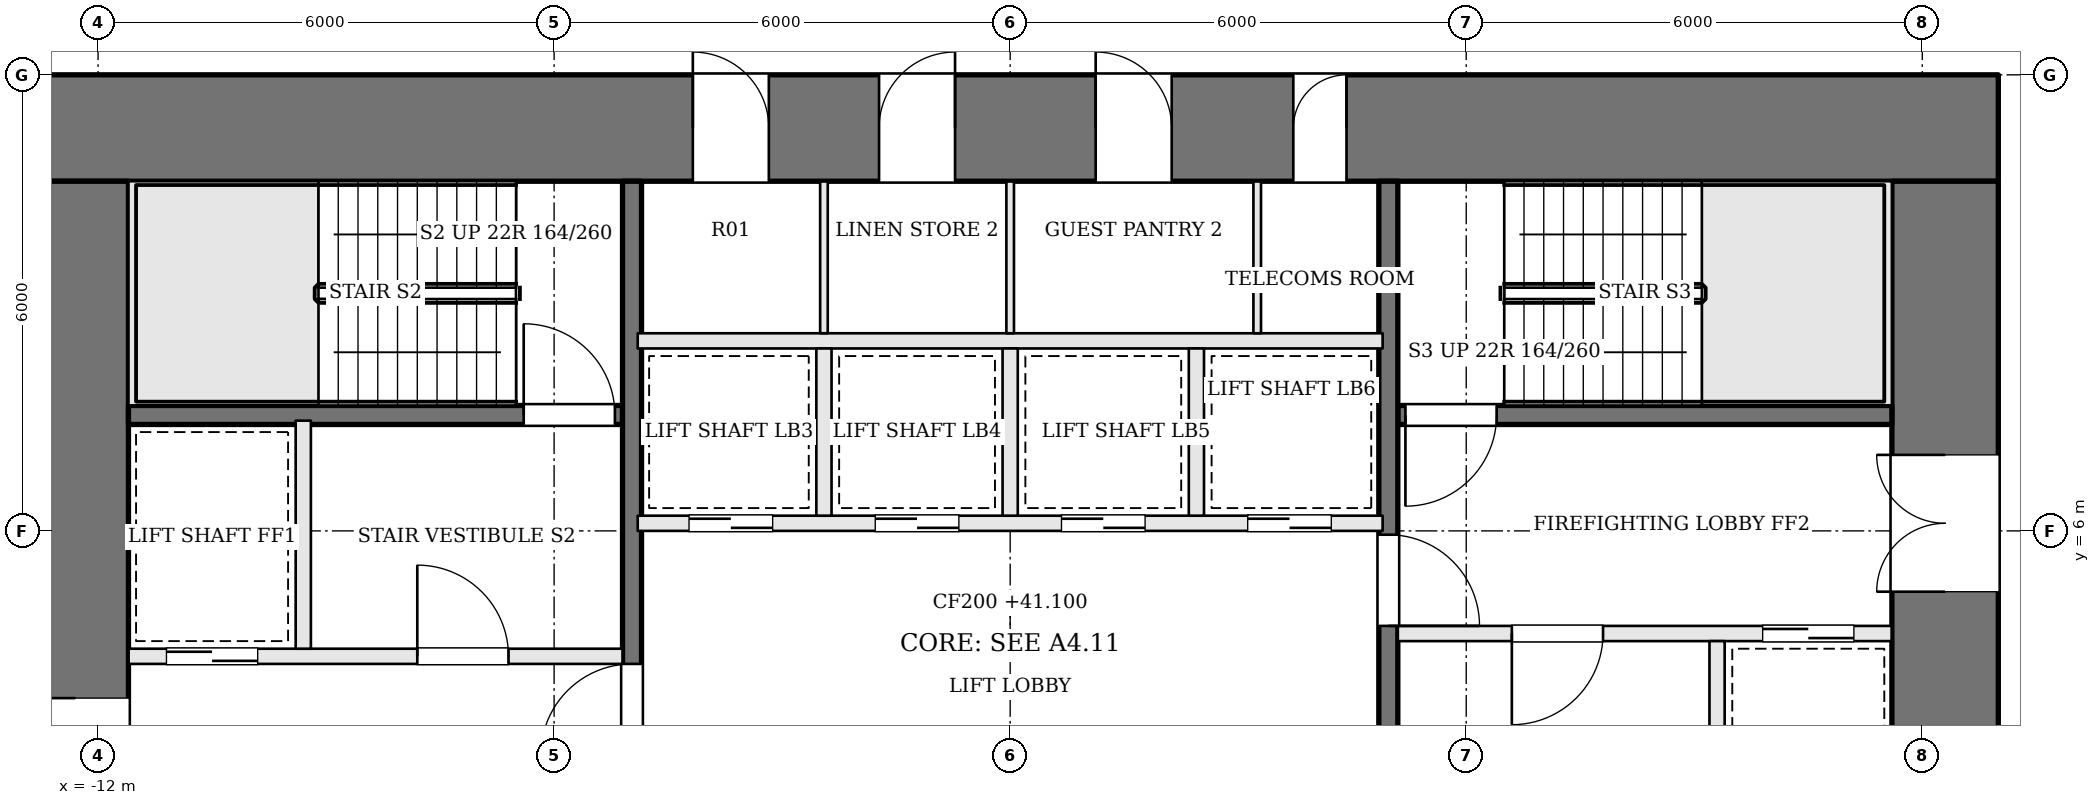
"""IFC4 building model, lengths in metres.
Left out: names, types, materials, properties, quantities, classifications, styles, units other than length and angle.
Written with IfcOpenShell. Run it as: python <this file> out.ifc"""

import sys

from ifc_helpers import new_model, si_unit, direction, frame, frame_2d, origin, place, context, subcontext, project, spatial, rectangle, extrude, element, fill, save


model = new_model("IFC4")
c1 = context("Model", 3, precision=1e-05, world=origin(), true_north=direction((0.0, 1.0)))
c2 = subcontext(c1, "Body", "Model", "MODEL_VIEW")
j1 = project(units=[si_unit("LENGTHUNIT", "METRE"), si_unit("PLANEANGLEUNIT", "RADIAN")], contexts=[c1])
p1 = place(None, origin())
s1 = spatial("IfcSite", under=j1, at=p1, CompositionType="ELEMENT")
p2 = place(p1, origin())
s2 = spatial("IfcBuilding", under=s1, at=p2, CompositionType="ELEMENT")
p3 = place(p2, frame((0.0, 0.0, 41.1)))
s3 = spatial("IfcBuildingStorey", under=s2, at=p3, CompositionType="ELEMENT", Elevation=41.1)
p4 = place(p3, frame((-13.0, 11.3, 0.0), z_axis=(0.0, 0.0, 1.0), x_axis=(1.0, 0.0, 0.0)))
e1 = element("IfcWall", 1, at=p4, inside=s3, PredefinedType="SHEAR", context=c2, shape_type="SweptSolid", body=[
    extrude(rectangle(XDim=26.0, YDim=1.4, at=frame_2d((13.0, 0.0))), origin(), (0.0, 0.0, 1.0), 3.6),
])
p5 = place(p4, frame((8.825, 0.0, 0.0)))
e2 = element("IfcOpeningElement", 2, at=p5, cuts=e1, PredefinedType="OPENING", context=c2, shape_type="SweptSolid", body=[
    extrude(rectangle(XDim=1.0, YDim=2.1, at=frame_2d((0.5, 1.05))), frame((0.0, 0.71, 0.0), z_axis=(0.0, -1.0, 0.0), x_axis=(1.0, 0.0, 0.0)), (0.0, 0.0, 1.0), 1.42),
])
p6 = place(p4, frame((11.275, 0.0, 0.0)))
e3 = element("IfcOpeningElement", 3, at=p6, cuts=e1, PredefinedType="OPENING", context=c2, shape_type="SweptSolid", body=[
    extrude(rectangle(XDim=1.0, YDim=2.1, at=frame_2d((0.5, 1.05))), frame((0.0, 0.71, 0.0), z_axis=(0.0, -1.0, 0.0), x_axis=(1.0, 0.0, 0.0)), (0.0, 0.0, 1.0), 1.42),
])
p7 = place(p4, frame((14.125, 0.0, 0.0)))
e4 = element("IfcOpeningElement", 4, at=p7, cuts=e1, PredefinedType="OPENING", context=c2, shape_type="SweptSolid", body=[
    extrude(rectangle(XDim=1.0, YDim=2.1, at=frame_2d((0.5, 1.05))), frame((0.0, 0.71, 0.0), z_axis=(0.0, -1.0, 0.0), x_axis=(1.0, 0.0, 0.0)), (0.0, 0.0, 1.0), 1.42),
])
p8 = place(p4, frame((16.725, 0.0, 0.0)))
e5 = element("IfcOpeningElement", 5, at=p8, cuts=e1, PredefinedType="OPENING", context=c2, shape_type="SweptSolid", body=[
    extrude(rectangle(XDim=0.7, YDim=2.1, at=frame_2d((0.35, 1.05))), frame((0.0, 0.71, 0.0), z_axis=(0.0, -1.0, 0.0), x_axis=(1.0, 0.0, 0.0)), (0.0, 0.0, 1.0), 1.42),
])
p9 = place(p3, frame((12.3, -1.6, 0.0), z_axis=(0.0, 0.0, 1.0), x_axis=(0.0, 1.0, 0.0)))
e6 = element("IfcWall", 6, at=p9, inside=s3, PredefinedType="SHEAR", context=c2, shape_type="SweptSolid", body=[
    extrude(rectangle(XDim=12.2, YDim=1.4, at=frame_2d((6.1, 0.0))), origin(), (0.0, 0.0, 1.0), 3.6),
])
p10 = place(p9, frame((6.8, 0.0, 0.0)))
e7 = element("IfcOpeningElement", 7, at=p10, cuts=e6, PredefinedType="OPENING", context=c2, shape_type="SweptSolid", body=[
    extrude(rectangle(XDim=1.8, YDim=2.1, at=frame_2d((0.9, 1.05))), frame((0.0, 0.71, 0.0), z_axis=(0.0, -1.0, 0.0), x_axis=(1.0, 0.0, 0.0)), (0.0, 0.0, 1.0), 1.42),
])
p11 = place(p3, frame((-12.3, -1.6, 0.0), z_axis=(0.0, 0.0, 1.0), x_axis=(0.0, 1.0, 0.0)))
e8 = element("IfcWall", 8, at=p11, inside=s3, PredefinedType="SHEAR", context=c2, shape_type="SweptSolid", body=[
    extrude(rectangle(XDim=12.2, YDim=1.4, at=frame_2d((6.1, 0.0))), origin(), (0.0, 0.0, 1.0), 3.6),
])
p12 = place(p11, frame((3.6, 0.0, 0.0)))
e9 = element("IfcOpeningElement", 9, at=p12, cuts=e8, PredefinedType="OPENING", context=c2, shape_type="SweptSolid", body=[
    extrude(rectangle(XDim=1.8, YDim=2.1, at=frame_2d((0.9, 1.05))), frame((0.0, 0.71, 0.0), z_axis=(0.0, -1.0, 0.0), x_axis=(1.0, 0.0, 0.0)), (0.0, 0.0, 1.0), 1.42),
])
p13 = place(p3, frame((11.6, 7.525, 0.0), z_axis=(0.0, 0.0, 1.0), x_axis=(-1.0, 0.0, 0.0)))
e10 = element("IfcWall", 10, at=p13, inside=s3, PredefinedType="SOLIDWALL", context=c2, shape_type="SweptSolid", body=[
    extrude(rectangle(XDim=6.5, YDim=0.25, at=frame_2d((3.25, 0.0))), origin(), (0.0, 0.0, 1.0), 3.4),
])
p14 = place(p13, frame((5.2, 0.0, 0.0)))
e11 = element("IfcOpeningElement", 11, at=p14, cuts=e10, PredefinedType="OPENING", context=c2, shape_type="SweptSolid", body=[
    extrude(rectangle(XDim=1.2, YDim=2.1, at=frame_2d((0.6, 1.05))), frame((0.0, 0.135, 0.0), z_axis=(0.0, -1.0, 0.0), x_axis=(1.0, 0.0, 0.0)), (0.0, 0.0, 1.0), 0.27),
])
p15 = place(p3, frame((-11.6, 4.35, 0.0), z_axis=(0.0, 0.0, 1.0), x_axis=(1.0, 0.0, 0.0)))
e12 = element("IfcWall", 12, at=p15, inside=s3, PredefinedType="SOLIDWALL", context=c2, shape_type="SweptSolid", body=[
    extrude(rectangle(XDim=6.5, YDim=0.2, at=frame_2d((3.25, 0.0))), origin(), (0.0, 0.0, 1.0), 3.4),
])
p16 = place(p15, frame((3.8, 0.0, 0.0)))
e13 = element("IfcOpeningElement", 13, at=p16, cuts=e12, PredefinedType="OPENING", context=c2, shape_type="SweptSolid", body=[
    extrude(rectangle(XDim=1.2, YDim=2.1, at=frame_2d((0.6, 1.05))), frame((0.0, 0.11, 0.0), z_axis=(0.0, -1.0, 0.0), x_axis=(1.0, 0.0, 0.0)), (0.0, 0.0, 1.0), 0.22),
])
p17 = place(p15, frame((0.5, 0.0, 0.0)))
e14 = element("IfcOpeningElement", 14, at=p17, cuts=e12, PredefinedType="OPENING", context=c2, shape_type="SweptSolid", body=[
    extrude(rectangle(XDim=1.2, YDim=2.1, at=frame_2d((0.6, 1.05))), frame((0.0, 0.11, 0.0), z_axis=(0.0, -1.0, 0.0), x_axis=(1.0, 0.0, 0.0)), (0.0, 0.0, 1.0), 0.22),
])
p18 = place(p3, frame((11.6, 4.65, 0.0), z_axis=(0.0, 0.0, 1.0), x_axis=(-1.0, 0.0, 0.0)))
e15 = element("IfcWall", 15, at=p18, inside=s3, PredefinedType="SOLIDWALL", context=c2, shape_type="SweptSolid", body=[
    extrude(rectangle(XDim=6.5, YDim=0.2, at=frame_2d((3.25, 0.0))), origin(), (0.0, 0.0, 1.0), 3.4),
])
p19 = place(p18, frame((3.8, 0.0, 0.0)))
e16 = element("IfcOpeningElement", 16, at=p19, cuts=e15, PredefinedType="OPENING", context=c2, shape_type="SweptSolid", body=[
    extrude(rectangle(XDim=1.2, YDim=2.1, at=frame_2d((0.6, 1.05))), frame((0.0, 0.11, 0.0), z_axis=(0.0, -1.0, 0.0), x_axis=(1.0, 0.0, 0.0)), (0.0, 0.0, 1.0), 0.22),
])
p20 = place(p18, frame((0.5, 0.0, 0.0)))
e17 = element("IfcOpeningElement", 17, at=p20, cuts=e15, PredefinedType="OPENING", context=c2, shape_type="SweptSolid", body=[
    extrude(rectangle(XDim=1.2, YDim=2.1, at=frame_2d((0.6, 1.05))), frame((0.0, 0.11, 0.0), z_axis=(0.0, -1.0, 0.0), x_axis=(1.0, 0.0, 0.0)), (0.0, 0.0, 1.0), 0.22),
])
p21 = place(p3, frame((-11.6, 7.525, 0.0), z_axis=(0.0, 0.0, 1.0), x_axis=(1.0, 0.0, 0.0)))
e18 = element("IfcWall", 18, at=p21, inside=s3, PredefinedType="SOLIDWALL", context=c2, shape_type="SweptSolid", body=[
    extrude(rectangle(XDim=6.5, YDim=0.25, at=frame_2d((3.25, 0.0))), origin(), (0.0, 0.0, 1.0), 3.4),
])
p22 = place(p21, frame((5.2, 0.0, 0.0)))
e19 = element("IfcOpeningElement", 19, at=p22, cuts=e18, PredefinedType="OPENING", context=c2, shape_type="SweptSolid", body=[
    extrude(rectangle(XDim=1.2, YDim=2.1, at=frame_2d((0.6, 1.05))), frame((0.0, 0.135, 0.0), z_axis=(0.0, -1.0, 0.0), x_axis=(1.0, 0.0, 0.0)), (0.0, 0.0, 1.0), 0.27),
])
for number, where, z_axis, x_axis in (
    (20, (-9.3, 4.45, 0.0), (0.0, 0.0, 1.0), (0.0, 1.0, 0.0)),
    (21, (9.3, 4.55, 0.0), (0.0, 0.0, 1.0), (0.0, -1.0, 0.0)),
):
    element("IfcWall", number, at=place(p3, frame(where, z_axis=z_axis, x_axis=x_axis)), inside=s3, PredefinedType="SOLIDWALL", context=c2, shape_type="SweptSolid", body=[
        extrude(rectangle(XDim=3.0, YDim=0.2, at=frame_2d((1.5, 0.0))), origin(), (0.0, 0.0, 1.0), 3.4),
    ])
p23 = place(p3, frame((-4.975, -1.6, 0.0), z_axis=(0.0, 0.0, 1.0), x_axis=(0.0, 1.0, 0.0)))
e22 = element("IfcWall", 22, at=p23, inside=s3, PredefinedType="SOLIDWALL", context=c2, shape_type="SweptSolid", body=[
    extrude(rectangle(XDim=12.2, YDim=0.25, at=frame_2d((6.1, 0.0))), origin(), (0.0, 0.0, 1.0), 3.4),
])
p24 = place(p23, frame((4.65, 0.0, 0.0)))
e23 = element("IfcOpeningElement", 23, at=p24, cuts=e22, PredefinedType="OPENING", context=c2, shape_type="SweptSolid", body=[
    extrude(rectangle(XDim=1.2, YDim=2.1, at=frame_2d((0.6, 1.05))), frame((0.0, 0.135, 0.0), z_axis=(0.0, -1.0, 0.0), x_axis=(1.0, 0.0, 0.0)), (0.0, 0.0, 1.0), 0.27),
])
p25 = place(p3, frame((4.975, 10.6, 0.0), z_axis=(0.0, 0.0, 1.0), x_axis=(0.0, -1.0, 0.0)))
e24 = element("IfcWall", 24, at=p25, inside=s3, PredefinedType="SOLIDWALL", context=c2, shape_type="SweptSolid", body=[
    extrude(rectangle(XDim=12.2, YDim=0.25, at=frame_2d((6.1, 0.0))), origin(), (0.0, 0.0, 1.0), 3.4),
])
p26 = place(p25, frame((4.65, 0.0, 0.0)))
e25 = element("IfcOpeningElement", 25, at=p26, cuts=e24, PredefinedType="OPENING", context=c2, shape_type="SweptSolid", body=[
    extrude(rectangle(XDim=1.2, YDim=2.1, at=frame_2d((0.6, 1.05))), frame((0.0, 0.135, 0.0), z_axis=(0.0, -1.0, 0.0), x_axis=(1.0, 0.0, 0.0)), (0.0, 0.0, 1.0), 0.27),
])
p27 = place(p3, frame((-4.9, 6.1, 0.0), z_axis=(0.0, 0.0, 1.0), x_axis=(1.0, 0.0, 0.0)))
e26 = element("IfcWall", 26, at=p27, inside=s3, PredefinedType="SOLIDWALL", context=c2, shape_type="SweptSolid", body=[
    extrude(rectangle(XDim=9.8, YDim=0.2, at=frame_2d((4.9, 0.0))), origin(), (0.0, 0.0, 1.0), 3.4),
])
p28 = place(p27, frame((0.675, 0.0, 0.0)))
e27 = element("IfcOpeningElement", 27, at=p28, cuts=e26, PredefinedType="OPENING", context=c2, shape_type="SweptSolid", body=[
    extrude(rectangle(XDim=1.1, YDim=2.1, at=frame_2d((0.55, 1.05))), frame((0.0, 0.11, 0.0), z_axis=(0.0, -1.0, 0.0), x_axis=(1.0, 0.0, 0.0)), (0.0, 0.0, 1.0), 0.22),
])
p29 = place(p27, frame((3.125, 0.0, 0.0)))
e28 = element("IfcOpeningElement", 28, at=p29, cuts=e26, PredefinedType="OPENING", context=c2, shape_type="SweptSolid", body=[
    extrude(rectangle(XDim=1.1, YDim=2.1, at=frame_2d((0.55, 1.05))), frame((0.0, 0.11, 0.0), z_axis=(0.0, -1.0, 0.0), x_axis=(1.0, 0.0, 0.0)), (0.0, 0.0, 1.0), 0.22),
])
p30 = place(p27, frame((5.575, 0.0, 0.0)))
e29 = element("IfcOpeningElement", 29, at=p30, cuts=e26, PredefinedType="OPENING", context=c2, shape_type="SweptSolid", body=[
    extrude(rectangle(XDim=1.1, YDim=2.1, at=frame_2d((0.55, 1.05))), frame((0.0, 0.11, 0.0), z_axis=(0.0, -1.0, 0.0), x_axis=(1.0, 0.0, 0.0)), (0.0, 0.0, 1.0), 0.22),
])
p31 = place(p27, frame((8.025, 0.0, 0.0)))
e30 = element("IfcOpeningElement", 30, at=p31, cuts=e26, PredefinedType="OPENING", context=c2, shape_type="SweptSolid", body=[
    extrude(rectangle(XDim=1.1, YDim=2.1, at=frame_2d((0.55, 1.05))), frame((0.0, 0.11, 0.0), z_axis=(0.0, -1.0, 0.0), x_axis=(1.0, 0.0, 0.0)), (0.0, 0.0, 1.0), 0.22),
])
p32 = place(p3, frame((-4.9, 8.5, 0.0), z_axis=(0.0, 0.0, 1.0), x_axis=(1.0, 0.0, 0.0)))
e31 = element("IfcWall", 31, at=p32, inside=s3, PredefinedType="SOLIDWALL", context=c2, shape_type="SweptSolid", body=[
    extrude(rectangle(XDim=9.8, YDim=0.2, at=frame_2d((4.9, 0.0))), origin(), (0.0, 0.0, 1.0), 3.4),
])
for number, where, z_axis, x_axis in (
    (32, (-2.45, 6.2, 0.0), (0.0, 0.0, 1.0), (0.0, 1.0, 0.0)),
    (33, (0.0, 6.2, 0.0), (0.0, 0.0, 1.0), (0.0, 1.0, 0.0)),
    (34, (2.45, 6.2, 0.0), (0.0, 0.0, 1.0), (0.0, 1.0, 0.0)),
):
    element("IfcWall", number, at=place(p3, frame(where, z_axis=z_axis, x_axis=x_axis)), inside=s3, PredefinedType="SOLIDWALL", context=c2, shape_type="SweptSolid", body=[
        extrude(rectangle(XDim=2.2, YDim=0.2, at=frame_2d((1.1, 0.0))), origin(), (0.0, 0.0, 1.0), 3.4),
    ])
for number, where, z_axis, x_axis in (
    (35, (-2.45, 8.6, 0.0), (0.0, 0.0, 1.0), (0.0, 1.0, 0.0)),
    (36, (0.0, 8.6, 0.0), (0.0, 0.0, 1.0), (0.0, 1.0, 0.0)),
    (37, (3.25, 8.6, 0.0), (0.0, 0.0, 1.0), (0.0, 1.0, 0.0)),
):
    element("IfcWall", number, at=place(p3, frame(where, z_axis=z_axis, x_axis=x_axis)), inside=s3, PredefinedType="PARTITIONING", context=c2, shape_type="SweptSolid", body=[
        extrude(rectangle(XDim=2.0, YDim=0.1, at=frame_2d((1.0, 0.0))), origin(), (0.0, 0.0, 1.0), 3.4),
    ])
p33 = place(p12, origin())
e38 = element("IfcDoor", 38, at=p33, inside=s3, OperationType="DOUBLE_DOOR_SINGLE_SWING", PredefinedType="DOOR", context=c2, shape_type="SweptSolid", body=[
    extrude(rectangle(XDim=1.8, YDim=2.1, at=frame_2d((0.9, 1.05))), frame((0.0, 0.025, 0.0), z_axis=(0.0, -1.0, 0.0), x_axis=(1.0, 0.0, 0.0)), (0.0, 0.0, 1.0), 0.05),
])
fill(e9, e38)
p34 = place(p10, origin())
e39 = element("IfcDoor", 39, at=p34, inside=s3, OperationType="DOUBLE_DOOR_SINGLE_SWING", PredefinedType="DOOR", context=c2, shape_type="SweptSolid", body=[
    extrude(rectangle(XDim=1.8, YDim=2.1, at=frame_2d((0.9, 1.05))), frame((0.0, 0.025, 0.0), z_axis=(0.0, -1.0, 0.0), x_axis=(1.0, 0.0, 0.0)), (0.0, 0.0, 1.0), 0.05),
])
fill(e7, e39)
p35 = place(p24, origin())
e40 = element("IfcDoor", 40, at=p35, inside=s3, OperationType="SINGLE_SWING_LEFT", PredefinedType="DOOR", context=c2, shape_type="SweptSolid", body=[
    extrude(rectangle(XDim=1.2, YDim=2.1, at=frame_2d((0.6, 1.05))), frame((0.0, 0.025, 0.0), z_axis=(0.0, -1.0, 0.0), x_axis=(1.0, 0.0, 0.0)), (0.0, 0.0, 1.0), 0.05),
])
fill(e23, e40)
p36 = place(p26, origin())
e41 = element("IfcDoor", 41, at=p36, inside=s3, OperationType="SINGLE_SWING_RIGHT", PredefinedType="DOOR", context=c2, shape_type="SweptSolid", body=[
    extrude(rectangle(XDim=1.2, YDim=2.1, at=frame_2d((0.6, 1.05))), frame((0.0, 0.025, 0.0), z_axis=(0.0, -1.0, 0.0), x_axis=(1.0, 0.0, 0.0)), (0.0, 0.0, 1.0), 0.05),
])
fill(e25, e41)
p37 = place(p16, origin())
e42 = element("IfcDoor", 42, at=p37, inside=s3, OperationType="SINGLE_SWING_LEFT", PredefinedType="DOOR", context=c2, shape_type="SweptSolid", body=[
    extrude(rectangle(XDim=1.2, YDim=2.1, at=frame_2d((0.6, 1.05))), frame((0.0, 0.025, 0.0), z_axis=(0.0, -1.0, 0.0), x_axis=(1.0, 0.0, 0.0)), (0.0, 0.0, 1.0), 0.05),
])
fill(e13, e42)
p38 = place(p19, origin())
e43 = element("IfcDoor", 43, at=p38, inside=s3, OperationType="SINGLE_SWING_RIGHT", PredefinedType="DOOR", context=c2, shape_type="SweptSolid", body=[
    extrude(rectangle(XDim=1.2, YDim=2.1, at=frame_2d((0.6, 1.05))), frame((0.0, 0.025, 0.0), z_axis=(0.0, -1.0, 0.0), x_axis=(1.0, 0.0, 0.0)), (0.0, 0.0, 1.0), 0.05),
])
fill(e16, e43)
p39 = place(p14, origin())
e44 = element("IfcDoor", 44, at=p39, inside=s3, OperationType="SINGLE_SWING_RIGHT", PredefinedType="DOOR", context=c2, shape_type="SweptSolid", body=[
    extrude(rectangle(XDim=1.2, YDim=2.1, at=frame_2d((0.6, 1.05))), frame((0.0, 0.025, 0.0), z_axis=(0.0, -1.0, 0.0), x_axis=(1.0, 0.0, 0.0)), (0.0, 0.0, 1.0), 0.05),
])
fill(e11, e44)
p40 = place(p22, origin())
e45 = element("IfcDoor", 45, at=p40, inside=s3, OperationType="SINGLE_SWING_LEFT", PredefinedType="DOOR", context=c2, shape_type="SweptSolid", body=[
    extrude(rectangle(XDim=1.2, YDim=2.1, at=frame_2d((0.6, 1.05))), frame((0.0, 0.025, 0.0), z_axis=(0.0, -1.0, 0.0), x_axis=(1.0, 0.0, 0.0)), (0.0, 0.0, 1.0), 0.05),
])
fill(e19, e45)
p41 = place(p17, origin())
e46 = element("IfcDoor", 46, at=p41, inside=s3, OperationType="SLIDING_TO_RIGHT", PredefinedType="DOOR", context=c2, shape_type="SweptSolid", body=[
    extrude(rectangle(XDim=1.2, YDim=2.1, at=frame_2d((0.6, 1.05))), frame((0.0, 0.025, 0.0), z_axis=(0.0, -1.0, 0.0), x_axis=(1.0, 0.0, 0.0)), (0.0, 0.0, 1.0), 0.05),
])
fill(e14, e46)
p42 = place(p20, origin())
e47 = element("IfcDoor", 47, at=p42, inside=s3, OperationType="SLIDING_TO_RIGHT", PredefinedType="DOOR", context=c2, shape_type="SweptSolid", body=[
    extrude(rectangle(XDim=1.2, YDim=2.1, at=frame_2d((0.6, 1.05))), frame((0.0, 0.025, 0.0), z_axis=(0.0, -1.0, 0.0), x_axis=(1.0, 0.0, 0.0)), (0.0, 0.0, 1.0), 0.05),
])
fill(e17, e47)
p43 = place(p28, origin())
e48 = element("IfcDoor", 48, at=p43, inside=s3, OperationType="SLIDING_TO_RIGHT", PredefinedType="DOOR", context=c2, shape_type="SweptSolid", body=[
    extrude(rectangle(XDim=1.1, YDim=2.1, at=frame_2d((0.55, 1.05))), frame((0.0, 0.025, 0.0), z_axis=(0.0, -1.0, 0.0), x_axis=(1.0, 0.0, 0.0)), (0.0, 0.0, 1.0), 0.05),
])
fill(e27, e48)
p44 = place(p29, origin())
e49 = element("IfcDoor", 49, at=p44, inside=s3, OperationType="SLIDING_TO_LEFT", PredefinedType="DOOR", context=c2, shape_type="SweptSolid", body=[
    extrude(rectangle(XDim=1.1, YDim=2.1, at=frame_2d((0.55, 1.05))), frame((0.0, 0.025, 0.0), z_axis=(0.0, -1.0, 0.0), x_axis=(1.0, 0.0, 0.0)), (0.0, 0.0, 1.0), 0.05),
])
fill(e28, e49)
p45 = place(p30, origin())
e50 = element("IfcDoor", 50, at=p45, inside=s3, OperationType="SLIDING_TO_RIGHT", PredefinedType="DOOR", context=c2, shape_type="SweptSolid", body=[
    extrude(rectangle(XDim=1.1, YDim=2.1, at=frame_2d((0.55, 1.05))), frame((0.0, 0.025, 0.0), z_axis=(0.0, -1.0, 0.0), x_axis=(1.0, 0.0, 0.0)), (0.0, 0.0, 1.0), 0.05),
])
fill(e29, e50)
p46 = place(p31, origin())
e51 = element("IfcDoor", 51, at=p46, inside=s3, OperationType="SLIDING_TO_LEFT", PredefinedType="DOOR", context=c2, shape_type="SweptSolid", body=[
    extrude(rectangle(XDim=1.1, YDim=2.1, at=frame_2d((0.55, 1.05))), frame((0.0, 0.025, 0.0), z_axis=(0.0, -1.0, 0.0), x_axis=(1.0, 0.0, 0.0)), (0.0, 0.0, 1.0), 0.05),
])
fill(e30, e51)
p47 = place(p5, origin())
e52 = element("IfcDoor", 52, at=p47, inside=s3, OperationType="SINGLE_SWING_LEFT", PredefinedType="DOOR", context=c2, shape_type="SweptSolid", body=[
    extrude(rectangle(XDim=1.0, YDim=2.1, at=frame_2d((0.5, 1.05))), frame((0.0, 0.025, 0.0), z_axis=(0.0, -1.0, 0.0), x_axis=(1.0, 0.0, 0.0)), (0.0, 0.0, 1.0), 0.05),
])
fill(e2, e52)
p48 = place(p6, origin())
e53 = element("IfcDoor", 53, at=p48, inside=s3, OperationType="SINGLE_SWING_RIGHT", PredefinedType="DOOR", context=c2, shape_type="SweptSolid", body=[
    extrude(rectangle(XDim=1.0, YDim=2.1, at=frame_2d((0.5, 1.05))), frame((0.0, 0.025, 0.0), z_axis=(0.0, -1.0, 0.0), x_axis=(1.0, 0.0, 0.0)), (0.0, 0.0, 1.0), 0.05),
])
fill(e3, e53)
p49 = place(p7, origin())
e54 = element("IfcDoor", 54, at=p49, inside=s3, OperationType="SINGLE_SWING_LEFT", PredefinedType="DOOR", context=c2, shape_type="SweptSolid", body=[
    extrude(rectangle(XDim=1.0, YDim=2.1, at=frame_2d((0.5, 1.05))), frame((0.0, 0.025, 0.0), z_axis=(0.0, -1.0, 0.0), x_axis=(1.0, 0.0, 0.0)), (0.0, 0.0, 1.0), 0.05),
])
fill(e4, e54)
p50 = place(p8, origin())
e55 = element("IfcDoor", 55, at=p50, inside=s3, OperationType="SINGLE_SWING_RIGHT", PredefinedType="DOOR", context=c2, shape_type="SweptSolid", body=[
    extrude(rectangle(XDim=0.7, YDim=2.1, at=frame_2d((0.35, 1.05))), frame((0.0, 0.025, 0.0), z_axis=(0.0, -1.0, 0.0), x_axis=(1.0, 0.0, 0.0)), (0.0, 0.0, 1.0), 0.05),
])
fill(e5, e55)
save(model, sys.argv[1])
